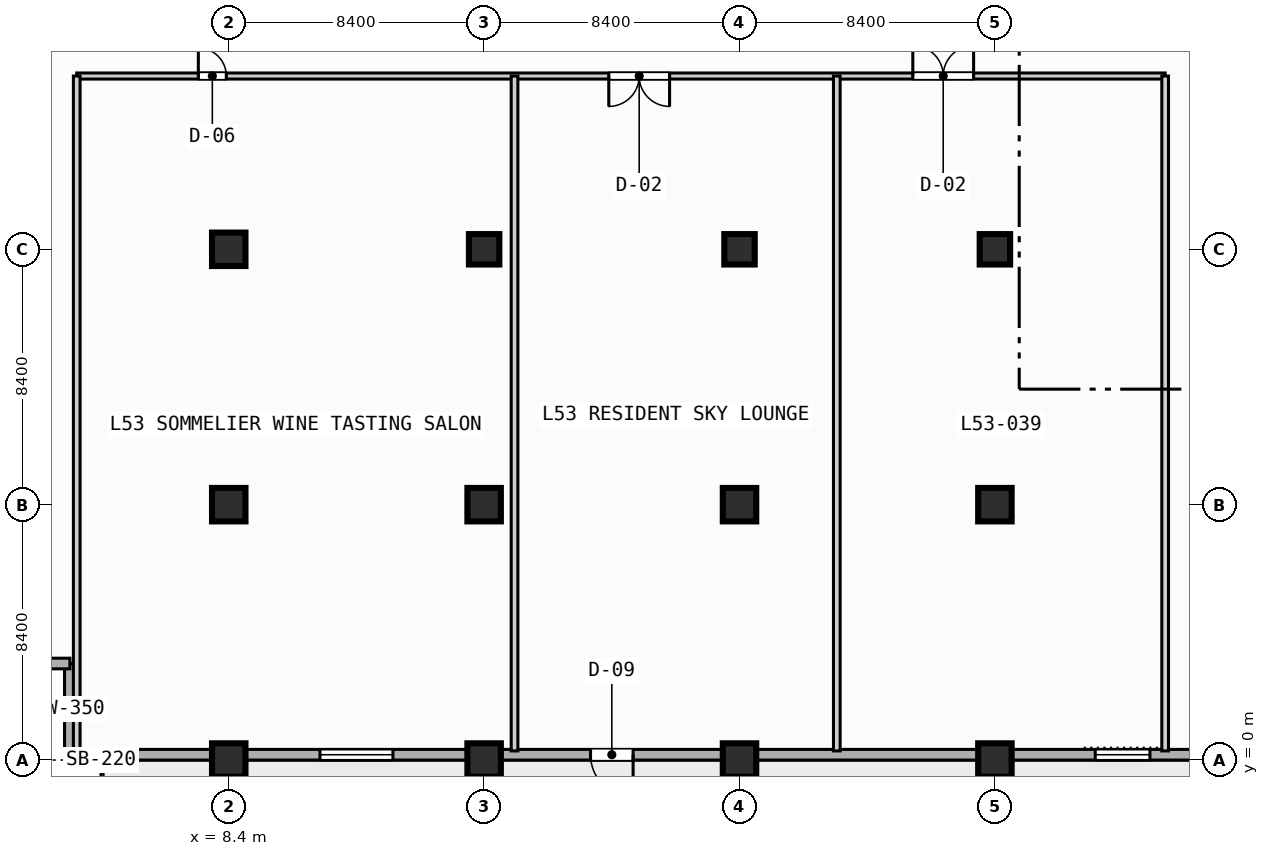
"""IFC4 building model, lengths in metres.
Left out: names, types, materials, properties, quantities, classifications, styles, units other than length and angle.
Written with IfcOpenShell. Run it as: python <this file> out.ifc"""

import sys

from ifc_helpers import new_model, si_unit, direction, frame, frame_2d, origin, origin_2d, place, context, subcontext, project, spatial, rectangle, extrude, element, fill, save


model = new_model("IFC4")
c1 = context("Model", 3, precision=1e-05, world=origin(), true_north=direction((0.0, 1.0)))
c2 = subcontext(c1, "Body", "Model", "MODEL_VIEW")
j1 = project(units=[si_unit("LENGTHUNIT", "METRE"), si_unit("PLANEANGLEUNIT", "RADIAN")], contexts=[c1])
p1 = place(None, origin())
s1 = spatial("IfcSite", under=j1, at=p1, CompositionType="ELEMENT")
p2 = place(p1, origin())
s2 = spatial("IfcBuilding", under=s1, at=p2, CompositionType="ELEMENT")
p3 = place(p2, frame((0.0, 0.0, 216.1)))
s3 = spatial("IfcBuildingStorey", under=s2, at=p3, CompositionType="ELEMENT", Elevation=216.1)
for number, where, z_axis, x_axis in (
    (1, (8.4, 0.0, 0.0), (0.0, 0.0, 1.0), (1.0, 0.0, 0.0)),
    (2, (8.4, 8.4, 0.0), (0.0, 0.0, 1.0), (1.0, 0.0, 0.0)),
    (3, (8.4, 16.8, 0.0), (0.0, 0.0, 1.0), (1.0, 0.0, 0.0)),
    (4, (16.8, 0.0, 0.0), (0.0, 0.0, 1.0), (1.0, 0.0, 0.0)),
    (5, (16.8, 8.4, 0.0), (0.0, 0.0, 1.0), (1.0, 0.0, 0.0)),
):
    element("IfcColumn", number, at=place(p3, frame(where, z_axis=z_axis, x_axis=x_axis)), inside=s3, PredefinedType="COLUMN", context=c2, shape_type="SweptSolid", body=[
        extrude(rectangle(XDim=1.1, YDim=1.1, at=origin_2d()), origin(), (0.0, 0.0, 1.0), 3.7),
    ])
p4 = place(p3, frame((16.8, 16.8, 0.0), z_axis=(0.0, 0.0, 1.0), x_axis=(1.0, 0.0, 0.0)))
e6 = element("IfcColumn", 6, at=p4, inside=s3, PredefinedType="COLUMN", context=c2, shape_type="SweptSolid", body=[
    extrude(rectangle(XDim=1.0, YDim=1.0, at=origin_2d()), origin(), (0.0, 0.0, 1.0), 3.7),
])
for number, where, z_axis, x_axis in (
    (7, (25.2, 0.0, 0.0), (0.0, 0.0, 1.0), (1.0, 0.0, 0.0)),
    (8, (25.2, 8.4, 0.0), (0.0, 0.0, 1.0), (1.0, 0.0, 0.0)),
):
    element("IfcColumn", number, at=place(p3, frame(where, z_axis=z_axis, x_axis=x_axis)), inside=s3, PredefinedType="COLUMN", context=c2, shape_type="SweptSolid", body=[
        extrude(rectangle(XDim=1.1, YDim=1.1, at=origin_2d()), origin(), (0.0, 0.0, 1.0), 3.7),
    ])
p5 = place(p3, frame((25.2, 16.8, 0.0), z_axis=(0.0, 0.0, 1.0), x_axis=(1.0, 0.0, 0.0)))
e9 = element("IfcColumn", 9, at=p5, inside=s3, PredefinedType="COLUMN", context=c2, shape_type="SweptSolid", body=[
    extrude(rectangle(XDim=1.0, YDim=1.0, at=origin_2d()), origin(), (0.0, 0.0, 1.0), 3.7),
])
for number, where, z_axis, x_axis in (
    (10, (33.6, 0.0, 0.0), (0.0, 0.0, 1.0), (1.0, 0.0, 0.0)),
    (11, (33.6, 8.4, 0.0), (0.0, 0.0, 1.0), (1.0, 0.0, 0.0)),
):
    element("IfcColumn", number, at=place(p3, frame(where, z_axis=z_axis, x_axis=x_axis)), inside=s3, PredefinedType="COLUMN", context=c2, shape_type="SweptSolid", body=[
        extrude(rectangle(XDim=1.1, YDim=1.1, at=origin_2d()), origin(), (0.0, 0.0, 1.0), 3.7),
    ])
p6 = place(p3, frame((33.6, 16.8, 0.0), z_axis=(0.0, 0.0, 1.0), x_axis=(1.0, 0.0, 0.0)))
e12 = element("IfcColumn", 12, at=p6, inside=s3, PredefinedType="COLUMN", context=c2, shape_type="SweptSolid", body=[
    extrude(rectangle(XDim=1.0, YDim=1.0, at=origin_2d()), origin(), (0.0, 0.0, 1.0), 3.7),
])
for number, where, z_axis, x_axis in (
    (13, (3.175, 0.175, 0.0), (0.0, 0.0, 1.0), (0.0, 1.0, 0.0)),
    (14, (3.175, 3.175, 0.0), (0.0, 0.0, 1.0), (-1.0, 0.0, 0.0)),
):
    element("IfcWall", number, at=place(p3, frame(where, z_axis=z_axis, x_axis=x_axis)), inside=s3, PredefinedType="STANDARD", context=c2, shape_type="SweptSolid", body=[
        extrude(rectangle(XDim=3.0, YDim=0.35, at=frame_2d((1.5, 0.0))), origin(), (0.0, 0.0, 1.0), 3.47),
    ])
p7 = place(p3, frame((72.425, 0.175, 0.0), z_axis=(0.0, 0.0, 1.0), x_axis=(-1.0, 0.0, 0.0)))
e15 = element("IfcWall", 15, at=p7, inside=s3, PredefinedType="STANDARD", context=c2, shape_type="SweptSolid", body=[
    extrude(rectangle(XDim=69.25, YDim=0.35, at=frame_2d((34.625, 0.0))), origin(), (0.0, 0.0, 1.0), 3.47),
])
p8 = place(p7, frame((50.725, 0.0, 0.0)))
e16 = element("IfcOpeningElement", 16, at=p8, cuts=e15, PredefinedType="OPENING", context=c2, shape_type="SweptSolid", body=[
    extrude(rectangle(XDim=1.4, YDim=2.2, at=frame_2d((0.7, 1.1))), frame((0.0, 0.185, 0.0), z_axis=(0.0, -1.0, 0.0), x_axis=(1.0, 0.0, 0.0)), (0.0, 0.0, 1.0), 0.37),
])
p9 = place(p7, frame((58.625, 0.0, 0.85)))
e17 = element("IfcOpeningElement", 17, at=p9, cuts=e15, PredefinedType="OPENING", context=c2, shape_type="SweptSolid", body=[
    extrude(rectangle(XDim=2.4, YDim=1.95, at=frame_2d((1.2, 0.975))), frame((0.0, 0.185, 0.0), z_axis=(0.0, -1.0, 0.0), x_axis=(1.0, 0.0, 0.0)), (0.0, 0.0, 1.0), 0.37),
])
p10 = place(p7, frame((33.725, 0.0, 0.85)))
e18 = element("IfcOpeningElement", 18, at=p10, cuts=e15, PredefinedType="OPENING", context=c2, shape_type="SweptSolid", body=[
    extrude(rectangle(XDim=1.8, YDim=1.8, at=frame_2d((0.9, 0.9))), frame((0.0, 0.185, 0.0), z_axis=(0.0, -1.0, 0.0), x_axis=(1.0, 0.0, 0.0)), (0.0, 0.0, 1.0), 0.37),
])
p11 = place(p7, frame((25.025, 0.0, 0.85)))
e19 = element("IfcOpeningElement", 19, at=p11, cuts=e15, PredefinedType="OPENING", context=c2, shape_type="SweptSolid", body=[
    extrude(rectangle(XDim=2.4, YDim=1.95, at=frame_2d((1.2, 0.975))), frame((0.0, 0.185, 0.0), z_axis=(0.0, -1.0, 0.0), x_axis=(1.0, 0.0, 0.0)), (0.0, 0.0, 1.0), 0.37),
])
p12 = place(p7, frame((9.075, 0.0, 0.85)))
e20 = element("IfcOpeningElement", 20, at=p12, cuts=e15, PredefinedType="OPENING", context=c2, shape_type="SweptSolid", body=[
    extrude(rectangle(XDim=1.8, YDim=1.8, at=frame_2d((0.9, 0.9))), frame((0.0, 0.185, 0.0), z_axis=(0.0, -1.0, 0.0), x_axis=(1.0, 0.0, 0.0)), (0.0, 0.0, 1.0), 0.37),
])
p13 = place(p7, frame((2.675, 0.0, 0.85)))
e21 = element("IfcOpeningElement", 21, at=p13, cuts=e15, PredefinedType="OPENING", context=c2, shape_type="SweptSolid", body=[
    extrude(rectangle(XDim=1.8, YDim=1.8, at=frame_2d((0.9, 0.9))), frame((0.0, 0.185, 0.0), z_axis=(0.0, -1.0, 0.0), x_axis=(1.0, 0.0, 0.0)), (0.0, 0.0, 1.0), 0.37),
])
p14 = place(p3, frame((3.4, 22.5, 0.0), z_axis=(0.0, 0.0, 1.0), x_axis=(1.0, 0.0, 0.0)))
e22 = element("IfcWall", 22, at=p14, inside=s3, PredefinedType="PARTITIONING", context=c2, shape_type="SweptSolid", body=[
    extrude(rectangle(XDim=35.8, YDim=0.2, at=frame_2d((17.9, 0.0))), origin(), (0.0, 0.0, 1.0), 3.47),
])
p15 = place(p14, frame((4.0, 0.0, 0.0)))
e23 = element("IfcOpeningElement", 23, at=p15, cuts=e22, PredefinedType="OPENING", context=c2, shape_type="SweptSolid", body=[
    extrude(rectangle(XDim=0.92, YDim=2.1, at=frame_2d((0.46, 1.05))), frame((0.0, 0.11, 0.0), z_axis=(0.0, -1.0, 0.0), x_axis=(1.0, 0.0, 0.0)), (0.0, 0.0, 1.0), 0.22),
])
p16 = place(p14, frame((17.5, 0.0, 0.0)))
e24 = element("IfcOpeningElement", 24, at=p16, cuts=e22, PredefinedType="OPENING", context=c2, shape_type="SweptSolid", body=[
    extrude(rectangle(XDim=2.0, YDim=2.15, at=frame_2d((1.0, 1.075))), frame((0.0, 0.11, 0.0), z_axis=(0.0, -1.0, 0.0), x_axis=(1.0, 0.0, 0.0)), (0.0, 0.0, 1.0), 0.22),
])
p17 = place(p14, frame((27.5, 0.0, 0.0)))
e25 = element("IfcOpeningElement", 25, at=p17, cuts=e22, PredefinedType="OPENING", context=c2, shape_type="SweptSolid", body=[
    extrude(rectangle(XDim=2.0, YDim=2.15, at=frame_2d((1.0, 1.075))), frame((0.0, 0.11, 0.0), z_axis=(0.0, -1.0, 0.0), x_axis=(1.0, 0.0, 0.0)), (0.0, 0.0, 1.0), 0.22),
])
for number, where, z_axis, x_axis in (
    (26, (3.4, 0.3, 0.0), (0.0, 0.0, 1.0), (0.0, 1.0, 0.0)),
    (27, (17.8, 0.3, 0.0), (0.0, 0.0, 1.0), (0.0, 1.0, 0.0)),
    (28, (28.4, 0.3, 0.0), (0.0, 0.0, 1.0), (0.0, 1.0, 0.0)),
    (29, (39.2, 0.3, 0.0), (0.0, 0.0, 1.0), (0.0, 1.0, 0.0)),
):
    element("IfcWall", number, at=place(p3, frame(where, z_axis=z_axis, x_axis=x_axis)), inside=s3, PredefinedType="PARTITIONING", context=c2, shape_type="SweptSolid", body=[
        extrude(rectangle(XDim=22.2, YDim=0.22, at=frame_2d((11.1, 0.0))), origin(), (0.0, 0.0, 1.0), 3.47),
    ])
p18 = place(p8, origin())
e30 = element("IfcDoor", 30, at=p18, inside=s3, OperationType="SINGLE_SWING_LEFT", PredefinedType="DOOR", context=c2, shape_type="SweptSolid", body=[
    extrude(rectangle(XDim=1.4, YDim=2.2, at=frame_2d((0.7, 1.1))), frame((0.0, 0.025, 0.0), z_axis=(0.0, -1.0, 0.0), x_axis=(1.0, 0.0, 0.0)), (0.0, 0.0, 1.0), 0.05),
])
fill(e16, e30)
p19 = place(p9, origin())
e31 = element("IfcWindow", 31, at=p19, inside=s3, PartitioningType="SINGLE_PANEL", PredefinedType="WINDOW", context=c2, shape_type="SweptSolid", body=[
    extrude(rectangle(XDim=2.4, YDim=1.95, at=frame_2d((1.2, 0.975))), frame((0.0, 0.03, 0.0), z_axis=(0.0, -1.0, 0.0), x_axis=(1.0, 0.0, 0.0)), (0.0, 0.0, 1.0), 0.06),
])
fill(e17, e31)
p20 = place(p10, origin())
e32 = element("IfcWindow", 32, at=p20, inside=s3, PartitioningType="SINGLE_PANEL", PredefinedType="WINDOW", context=c2, shape_type="SweptSolid", body=[
    extrude(rectangle(XDim=1.8, YDim=1.8, at=frame_2d((0.9, 0.9))), frame((0.0, 0.03, 0.0), z_axis=(0.0, -1.0, 0.0), x_axis=(1.0, 0.0, 0.0)), (0.0, 0.0, 1.0), 0.06),
])
fill(e18, e32)
p21 = place(p15, origin())
e33 = element("IfcDoor", 33, at=p21, inside=s3, OperationType="SINGLE_SWING_LEFT", PredefinedType="DOOR", context=c2, shape_type="SweptSolid", body=[
    extrude(rectangle(XDim=0.92, YDim=2.1, at=frame_2d((0.46, 1.05))), frame((0.0, 0.025, 0.0), z_axis=(0.0, -1.0, 0.0), x_axis=(1.0, 0.0, 0.0)), (0.0, 0.0, 1.0), 0.05),
])
fill(e23, e33)
p22 = place(p16, origin())
e34 = element("IfcDoor", 34, at=p22, inside=s3, OperationType="SINGLE_SWING_RIGHT", PredefinedType="DOOR", context=c2, shape_type="SweptSolid", body=[
    extrude(rectangle(XDim=2.0, YDim=2.15, at=frame_2d((1.0, 1.075))), frame((0.0, 0.025, 0.0), z_axis=(0.0, -1.0, 0.0), x_axis=(1.0, 0.0, 0.0)), (0.0, 0.0, 1.0), 0.05),
])
fill(e24, e34)
p23 = place(p17, origin())
e35 = element("IfcDoor", 35, at=p23, inside=s3, OperationType="SINGLE_SWING_LEFT", PredefinedType="DOOR", context=c2, shape_type="SweptSolid", body=[
    extrude(rectangle(XDim=2.0, YDim=2.15, at=frame_2d((1.0, 1.075))), frame((0.0, 0.025, 0.0), z_axis=(0.0, -1.0, 0.0), x_axis=(1.0, 0.0, 0.0)), (0.0, 0.0, 1.0), 0.05),
])
fill(e25, e35)
save(model, sys.argv[1])
